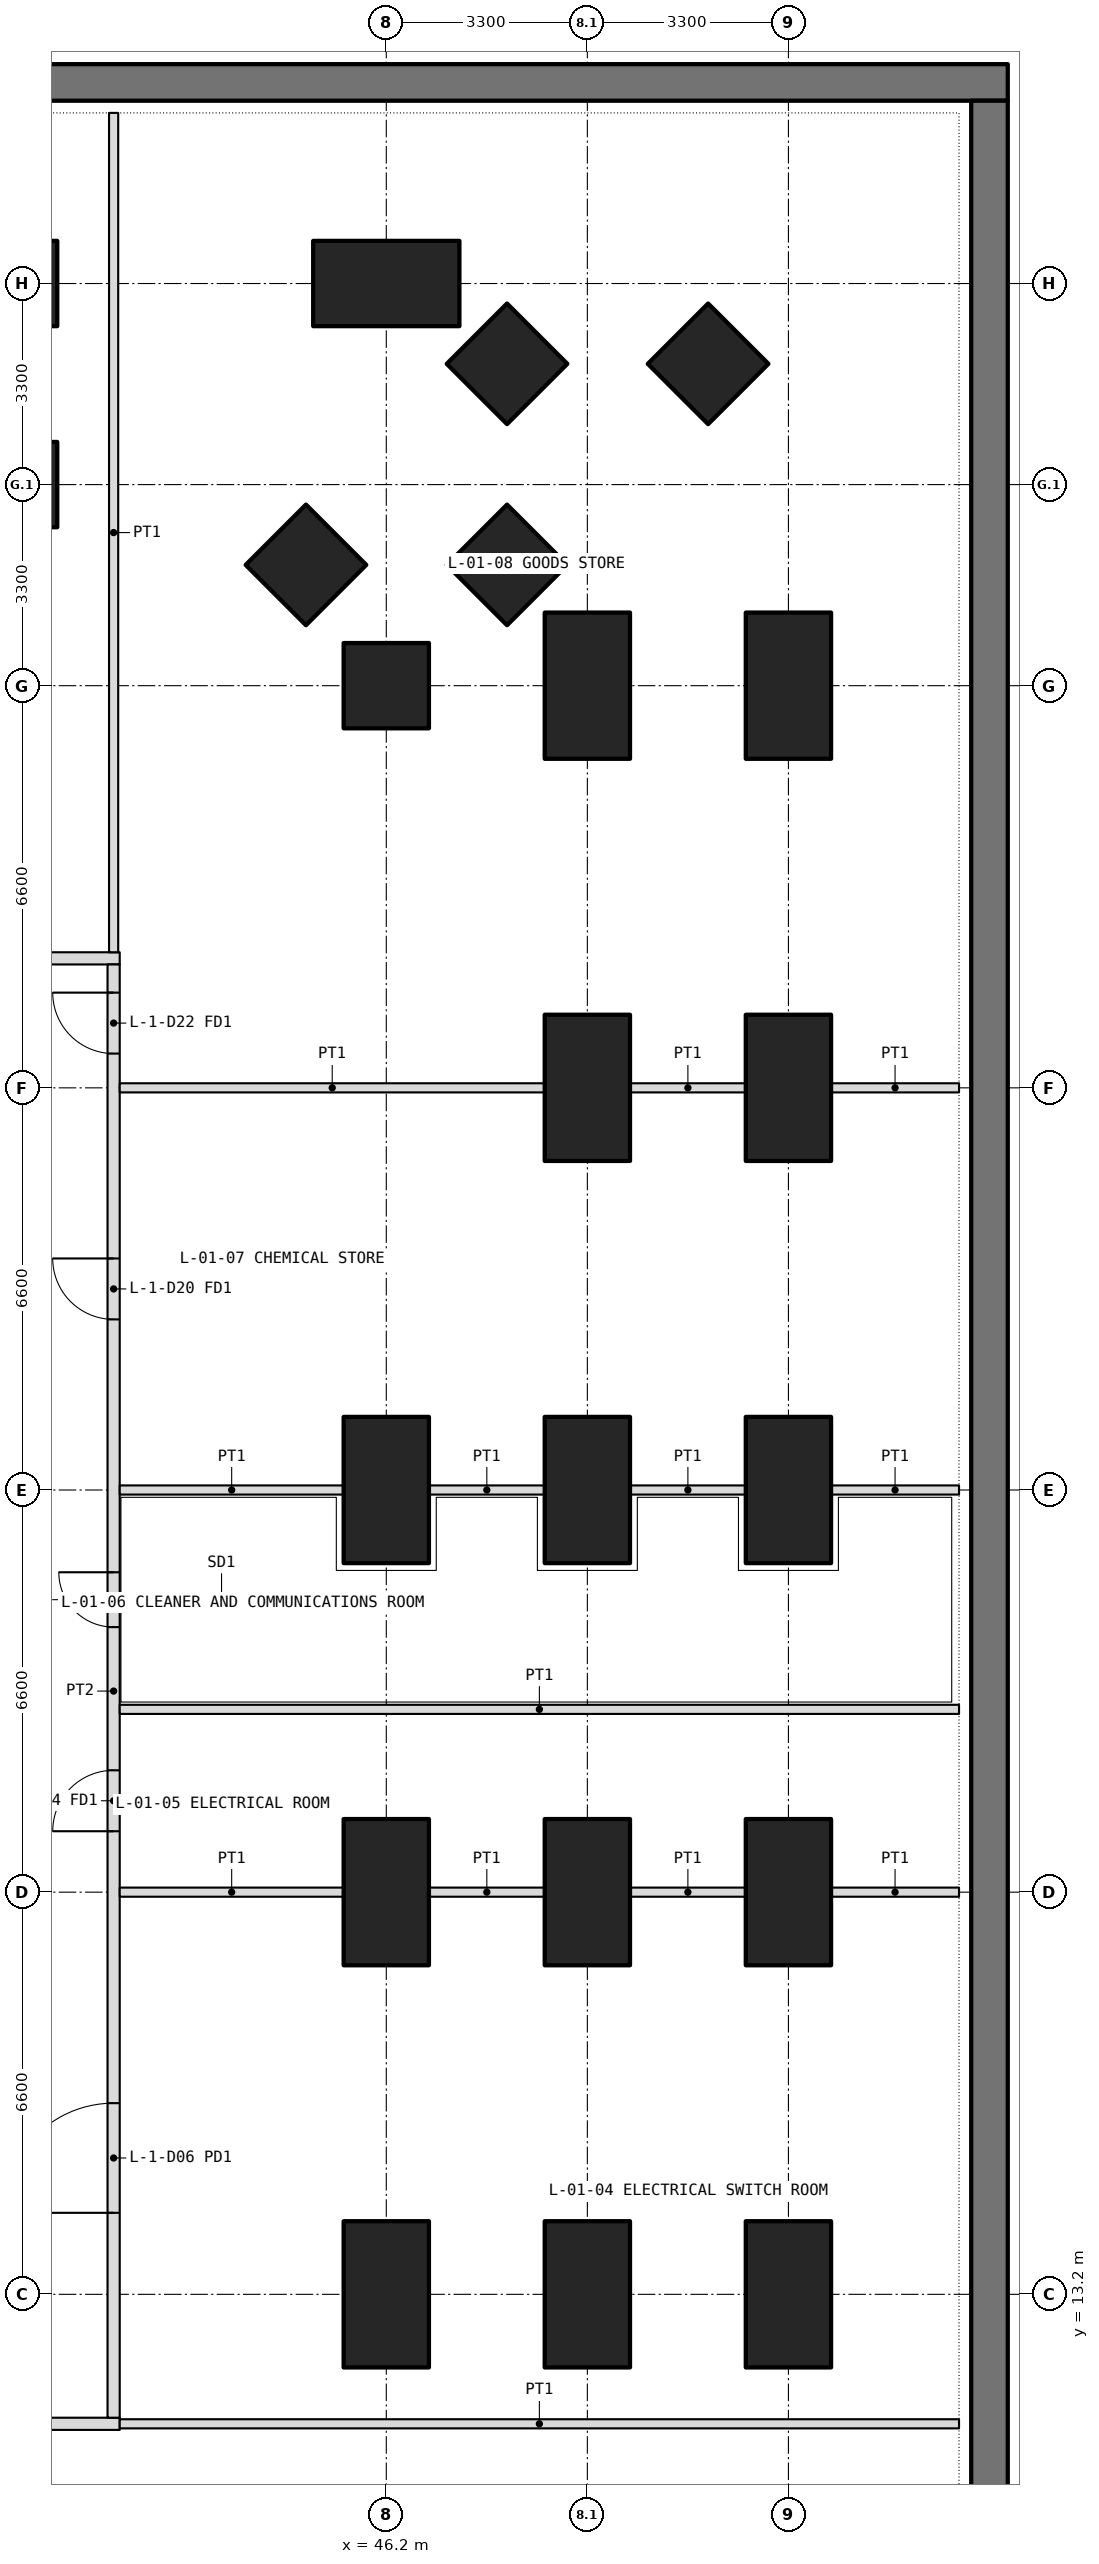
"""IFC4 building model, lengths in metres.
Left out: names, types, materials, properties, quantities, classifications, styles, units other than length and angle.
Written with IfcOpenShell. Run it as: python <this file> out.ifc"""

import sys

from ifc_helpers import new_model, si_unit, direction, frame, frame_2d, origin, origin_2d, place, context, subcontext, project, spatial, rectangle, extrude, element, fill, save


model = new_model("IFC4")
c1 = context("Model", 3, precision=1e-05, world=origin(), true_north=direction((0.0, 1.0)))
c2 = subcontext(c1, "Body", "Model", "MODEL_VIEW")
j1 = project(units=[si_unit("LENGTHUNIT", "METRE"), si_unit("PLANEANGLEUNIT", "RADIAN")], contexts=[c1])
p1 = place(None, origin())
s1 = spatial("IfcSite", under=j1, at=p1, CompositionType="ELEMENT")
p2 = place(p1, origin())
s2 = spatial("IfcBuilding", under=s1, at=p2, CompositionType="ELEMENT")
p3 = place(p2, frame((0.0, 0.0, -5.4)))
s3 = spatial("IfcBuildingStorey", under=s2, at=p3, CompositionType="ELEMENT", Elevation=-5.4)
p4 = place(p3, frame((-3.6, 49.5, -0.15), z_axis=(0.0, 0.0, 1.0), x_axis=(1.0, 0.0, 0.0)))
e1 = element("IfcWall", 1, at=p4, inside=s3, PredefinedType="SOLIDWALL", context=c2, shape_type="SweptSolid", body=[
    extrude(rectangle(XDim=60.0, YDim=0.6, at=frame_2d((30.0, 0.0))), origin(), (0.0, 0.0, 1.0), 5.2),
])
p5 = place(p3, frame((56.1, -3.0, -0.15), z_axis=(0.0, 0.0, 1.0), x_axis=(0.0, 1.0, 0.0)))
e2 = element("IfcWall", 2, at=p5, inside=s3, PredefinedType="SOLIDWALL", context=c2, shape_type="SweptSolid", body=[
    extrude(rectangle(XDim=52.2, YDim=0.6, at=frame_2d((26.1, 0.0))), origin(), (0.0, 0.0, 1.0), 5.2),
])
p6 = place(p3, frame((51.482, 44.882, -0.15), z_axis=(0.0, 0.0, 1.0), x_axis=(0.707106781187, 0.707106781187, 0.0)))
e3 = element("IfcColumn", 3, at=p6, inside=s3, PredefinedType="COLUMN", context=c2, shape_type="SweptSolid", body=[
    extrude(rectangle(XDim=1.4, YDim=1.4, at=origin_2d()), origin(), (0.0, 0.0, 1.0), 5.55),
])
for number, where, z_axis, x_axis in (
    (4, (52.8, 13.2, -0.15), (0.0, 0.0, 1.0), (0.0, 1.0, 0.0)),
    (5, (52.8, 19.8, -0.15), (0.0, 0.0, 1.0), (0.0, 1.0, 0.0)),
    (6, (52.8, 26.4, -0.15), (0.0, 0.0, 1.0), (0.0, 1.0, 0.0)),
    (7, (52.8, 33.0, -0.15), (0.0, 0.0, 1.0), (0.0, 1.0, 0.0)),
    (8, (52.8, 39.6, -0.15), (0.0, 0.0, 1.0), (0.0, 1.0, 0.0)),
    (9, (39.6, 46.2, -0.15), (0.0, 0.0, 1.0), (1.0, 0.0, 0.0)),
    (10, (46.2, 46.2, -0.15), (0.0, 0.0, 1.0), (1.0, 0.0, 0.0)),
):
    element("IfcColumn", number, at=place(p3, frame(where, z_axis=z_axis, x_axis=x_axis)), inside=s3, PredefinedType="COLUMN", context=c2, shape_type="SweptSolid", body=[
        extrude(rectangle(XDim=2.4, YDim=1.4, at=origin_2d()), origin(), (0.0, 0.0, 1.0), 5.55),
    ])
for number, where, z_axis, x_axis in (
    (11, (46.2, 39.6, -0.15), (0.0, 0.0, 1.0), (1.0, 0.0, 0.0)),
    (12, (48.182, 44.882, -0.15), (0.0, 0.0, 1.0), (0.707, 0.707, 0.0)),
):
    element("IfcColumn", number, at=place(p3, frame(where, z_axis=z_axis, x_axis=x_axis)), inside=s3, PredefinedType="COLUMN", context=c2, shape_type="SweptSolid", body=[
        extrude(rectangle(XDim=1.4, YDim=1.4, at=origin_2d()), origin(), (0.0, 0.0, 1.0), 5.55),
    ])
for number, where, z_axis, x_axis in (
    (13, (49.5, 13.2, -0.15), (0.0, 0.0, 1.0), (0.0, 1.0, 0.0)),
    (14, (49.5, 19.8, -0.15), (0.0, 0.0, 1.0), (0.0, 1.0, 0.0)),
    (15, (49.5, 26.4, -0.15), (0.0, 0.0, 1.0), (0.0, 1.0, 0.0)),
    (16, (49.5, 33.0, -0.15), (0.0, 0.0, 1.0), (0.0, 1.0, 0.0)),
    (17, (49.5, 39.6, -0.15), (0.0, 0.0, 1.0), (0.0, 1.0, 0.0)),
):
    element("IfcColumn", number, at=place(p3, frame(where, z_axis=z_axis, x_axis=x_axis)), inside=s3, PredefinedType="COLUMN", context=c2, shape_type="SweptSolid", body=[
        extrude(rectangle(XDim=2.4, YDim=1.4, at=origin_2d()), origin(), (0.0, 0.0, 1.0), 5.55),
    ])
p7 = place(p3, frame((48.182, 41.582, -0.15), z_axis=(0.0, 0.0, 1.0), x_axis=(0.707106781187, 0.707106781187, 0.0)))
e18 = element("IfcColumn", 18, at=p7, inside=s3, PredefinedType="COLUMN", context=c2, shape_type="SweptSolid", body=[
    extrude(rectangle(XDim=1.4, YDim=1.4, at=origin_2d()), origin(), (0.0, 0.0, 1.0), 5.55),
])
p8 = place(p3, frame((39.6, 42.9, -0.15), z_axis=(0.0, 0.0, 1.0), x_axis=(1.0, 0.0, 0.0)))
e19 = element("IfcColumn", 19, at=p8, inside=s3, PredefinedType="COLUMN", context=c2, shape_type="SweptSolid", body=[
    extrude(rectangle(XDim=2.4, YDim=1.4, at=origin_2d()), origin(), (0.0, 0.0, 1.0), 5.55),
])
p9 = place(p3, frame((44.882, 41.582, -0.15), z_axis=(0.0, 0.0, 1.0), x_axis=(0.707106781187, 0.707106781187, 0.0)))
e20 = element("IfcColumn", 20, at=p9, inside=s3, PredefinedType="COLUMN", context=c2, shape_type="SweptSolid", body=[
    extrude(rectangle(XDim=1.4, YDim=1.4, at=origin_2d()), origin(), (0.0, 0.0, 1.0), 5.55),
])
for number, where, z_axis, x_axis in (
    (21, (46.2, 13.2, -0.15), (0.0, 0.0, 1.0), (0.0, 1.0, 0.0)),
    (22, (46.2, 19.8, -0.15), (0.0, 0.0, 1.0), (0.0, 1.0, 0.0)),
    (23, (46.2, 26.4, -0.15), (0.0, 0.0, 1.0), (0.0, 1.0, 0.0)),
):
    element("IfcColumn", number, at=place(p3, frame(where, z_axis=z_axis, x_axis=x_axis)), inside=s3, PredefinedType="COLUMN", context=c2, shape_type="SweptSolid", body=[
        extrude(rectangle(XDim=2.4, YDim=1.4, at=origin_2d()), origin(), (0.0, 0.0, 1.0), 5.55),
    ])
p10 = place(p3, frame((10.975, 11.075, 0.0), z_axis=(0.0, 0.0, 1.0), x_axis=(1.0, 0.0, 0.0)))
e24 = element("IfcWall", 24, at=p10, inside=s3, PredefinedType="PARTITIONING", context=c2, shape_type="SweptSolid", body=[
    extrude(rectangle(XDim=30.85, YDim=0.2, at=frame_2d((15.425, 0.0))), origin(), (0.0, 0.0, 1.0), 4.05),
])
p11 = place(p10, frame((3.562, 0.0, 0.0)))
e25 = element("IfcOpeningElement", 25, at=p11, cuts=e24, PredefinedType="OPENING", context=c2, shape_type="SweptSolid", body=[
    extrude(rectangle(XDim=1.8, YDim=2.4, at=frame_2d((0.9, 1.2))), frame((0.0, 0.11, 0.0), z_axis=(0.0, -1.0, 0.0), x_axis=(1.0, 0.0, 0.0)), (0.0, 0.0, 1.0), 0.22),
])
p12 = place(p10, frame((14.525, 0.0, 0.0)))
e26 = element("IfcOpeningElement", 26, at=p12, cuts=e24, PredefinedType="OPENING", context=c2, shape_type="SweptSolid", body=[
    extrude(rectangle(XDim=1.8, YDim=2.4, at=frame_2d((0.9, 1.2))), frame((0.0, 0.11, 0.0), z_axis=(0.0, -1.0, 0.0), x_axis=(1.0, 0.0, 0.0)), (0.0, 0.0, 1.0), 0.22),
])
p13 = place(p10, frame((25.488, 0.0, 0.0)))
e27 = element("IfcOpeningElement", 27, at=p13, cuts=e24, PredefinedType="OPENING", context=c2, shape_type="SweptSolid", body=[
    extrude(rectangle(XDim=1.8, YDim=2.4, at=frame_2d((0.9, 1.2))), frame((0.0, 0.11, 0.0), z_axis=(0.0, -1.0, 0.0), x_axis=(1.0, 0.0, 0.0)), (0.0, 0.0, 1.0), 0.22),
])
p14 = place(p3, frame((10.975, 35.125, 0.0), z_axis=(0.0, 0.0, 1.0), x_axis=(1.0, 0.0, 0.0)))
e28 = element("IfcWall", 28, at=p14, inside=s3, PredefinedType="PARTITIONING", context=c2, shape_type="SweptSolid", body=[
    extrude(rectangle(XDim=30.85, YDim=0.2, at=frame_2d((15.425, 0.0))), origin(), (0.0, 0.0, 1.0), 4.05),
])
p15 = place(p14, frame((3.962, 0.0, 0.0)))
e29 = element("IfcOpeningElement", 29, at=p15, cuts=e28, PredefinedType="OPENING", context=c2, shape_type="SweptSolid", body=[
    extrude(rectangle(XDim=1.0, YDim=2.1, at=frame_2d((0.5, 1.05))), frame((0.0, 0.11, 0.0), z_axis=(0.0, -1.0, 0.0), x_axis=(1.0, 0.0, 0.0)), (0.0, 0.0, 1.0), 0.22),
])
p16 = place(p14, frame((14.925, 0.0, 0.0)))
e30 = element("IfcOpeningElement", 30, at=p16, cuts=e28, PredefinedType="OPENING", context=c2, shape_type="SweptSolid", body=[
    extrude(rectangle(XDim=1.0, YDim=2.1, at=frame_2d((0.5, 1.05))), frame((0.0, 0.11, 0.0), z_axis=(0.0, -1.0, 0.0), x_axis=(1.0, 0.0, 0.0)), (0.0, 0.0, 1.0), 0.22),
])
p17 = place(p14, frame((25.887, 0.0, 0.0)))
e31 = element("IfcOpeningElement", 31, at=p17, cuts=e28, PredefinedType="OPENING", context=c2, shape_type="SweptSolid", body=[
    extrude(rectangle(XDim=1.0, YDim=2.1, at=frame_2d((0.5, 1.05))), frame((0.0, 0.11, 0.0), z_axis=(0.0, -1.0, 0.0), x_axis=(1.0, 0.0, 0.0)), (0.0, 0.0, 1.0), 0.22),
])
p18 = place(p3, frame((41.725, 11.175, 0.0), z_axis=(0.0, 0.0, 1.0), x_axis=(0.0, 1.0, 0.0)))
e32 = element("IfcWall", 32, at=p18, inside=s3, PredefinedType="PARTITIONING", context=c2, shape_type="SweptSolid", body=[
    extrude(rectangle(XDim=23.85, YDim=0.2, at=frame_2d((11.925, 0.0))), origin(), (0.0, 0.0, 1.0), 4.05),
])
p19 = place(p18, frame((3.363, 0.0, 0.0)))
e33 = element("IfcOpeningElement", 33, at=p19, cuts=e32, PredefinedType="OPENING", context=c2, shape_type="SweptSolid", body=[
    extrude(rectangle(XDim=1.8, YDim=2.4, at=frame_2d((0.9, 1.2))), frame((0.0, 0.11, 0.0), z_axis=(0.0, -1.0, 0.0), x_axis=(1.0, 0.0, 0.0)), (0.0, 0.0, 1.0), 0.22),
])
p20 = place(p18, frame((9.625, 0.0, 0.0)))
e34 = element("IfcOpeningElement", 34, at=p20, cuts=e32, PredefinedType="OPENING", context=c2, shape_type="SweptSolid", body=[
    extrude(rectangle(XDim=1.0, YDim=2.1, at=frame_2d((0.5, 1.05))), frame((0.0, 0.11, 0.0), z_axis=(0.0, -1.0, 0.0), x_axis=(1.0, 0.0, 0.0)), (0.0, 0.0, 1.0), 0.22),
])
p21 = place(p18, frame((12.975, 0.0, 0.0)))
e35 = element("IfcOpeningElement", 35, at=p21, cuts=e32, PredefinedType="OPENING", context=c2, shape_type="SweptSolid", body=[
    extrude(rectangle(XDim=0.9, YDim=2.1, at=frame_2d((0.45, 1.05))), frame((0.0, 0.11, 0.0), z_axis=(0.0, -1.0, 0.0), x_axis=(1.0, 0.0, 0.0)), (0.0, 0.0, 1.0), 0.22),
])
p22 = place(p18, frame((18.025, 0.0, 0.0)))
e36 = element("IfcOpeningElement", 36, at=p22, cuts=e32, PredefinedType="OPENING", context=c2, shape_type="SweptSolid", body=[
    extrude(rectangle(XDim=1.0, YDim=2.1, at=frame_2d((0.5, 1.05))), frame((0.0, 0.11, 0.0), z_axis=(0.0, -1.0, 0.0), x_axis=(1.0, 0.0, 0.0)), (0.0, 0.0, 1.0), 0.22),
])
p23 = place(p18, frame((22.387, 0.0, 0.0)))
e37 = element("IfcOpeningElement", 37, at=p23, cuts=e32, PredefinedType="OPENING", context=c2, shape_type="SweptSolid", body=[
    extrude(rectangle(XDim=1.0, YDim=2.1, at=frame_2d((0.5, 1.05))), frame((0.0, 0.11, 0.0), z_axis=(0.0, -1.0, 0.0), x_axis=(1.0, 0.0, 0.0)), (0.0, 0.0, 1.0), 0.22),
])
p24 = place(p3, frame((55.6, 11.075, 0.0), z_axis=(0.0, 0.0, 1.0), x_axis=(-1.0, 0.0, 0.0)))
e38 = element("IfcWall", 38, at=p24, inside=s3, PredefinedType="PARTITIONING", context=c2, shape_type="SweptSolid", body=[
    extrude(rectangle(XDim=13.775, YDim=0.15, at=frame_2d((6.888, 0.0))), origin(), (0.0, 0.0, 1.0), 3.85),
])
p25 = place(p3, frame((41.725, 49.0, 0.0), z_axis=(0.0, 0.0, 1.0), x_axis=(0.0, -1.0, 0.0)))
e39 = element("IfcWall", 39, at=p25, inside=s3, PredefinedType="PARTITIONING", context=c2, shape_type="SweptSolid", body=[
    extrude(rectangle(XDim=13.775, YDim=0.15, at=frame_2d((6.887, 0.0))), origin(), (0.0, 0.0, 1.0), 3.85),
])
p26 = place(p3, frame((55.6, 22.8, 0.0), z_axis=(0.0, 0.0, 1.0), x_axis=(-1.0, 0.0, 0.0)))
e40 = element("IfcWall", 40, at=p26, inside=s3, PredefinedType="PARTITIONING", context=c2, shape_type="SweptSolid", body=[
    extrude(rectangle(XDim=13.775, YDim=0.15, at=frame_2d((6.888, 0.0))), origin(), (0.0, 0.0, 1.0), 3.85),
])
p27 = place(p3, frame((55.6, 26.4, 0.0), z_axis=(0.0, 0.0, 1.0), x_axis=(-1.0, 0.0, 0.0)))
e41 = element("IfcWall", 41, at=p27, inside=s3, PredefinedType="PARTITIONING", context=c2, shape_type="SweptSolid", body=[
    extrude(rectangle(XDim=2.1, YDim=0.15, at=frame_2d((1.05, 0.0))), origin(), (0.0, 0.0, 1.0), 4.05),
])
for number, where, z_axis, x_axis in (
    (42, (52.1, 26.4, 0.0), (0.0, 0.0, 1.0), (-1.0, 0.0, 0.0)),
    (43, (48.8, 26.4, 0.0), (0.0, 0.0, 1.0), (-1.0, 0.0, 0.0)),
):
    element("IfcWall", number, at=place(p3, frame(where, z_axis=z_axis, x_axis=x_axis)), inside=s3, PredefinedType="PARTITIONING", context=c2, shape_type="SweptSolid", body=[
        extrude(rectangle(XDim=1.9, YDim=0.15, at=frame_2d((0.95, 0.0))), origin(), (0.0, 0.0, 1.0), 4.05),
    ])
p28 = place(p3, frame((45.5, 26.4, 0.0), z_axis=(0.0, 0.0, 1.0), x_axis=(-1.0, 0.0, 0.0)))
e44 = element("IfcWall", 44, at=p28, inside=s3, PredefinedType="PARTITIONING", context=c2, shape_type="SweptSolid", body=[
    extrude(rectangle(XDim=3.675, YDim=0.15, at=frame_2d((1.837, 0.0))), origin(), (0.0, 0.0, 1.0), 4.05),
])
p29 = place(p3, frame((55.6, 19.8, 0.0), z_axis=(0.0, 0.0, 1.0), x_axis=(-1.0, 0.0, 0.0)))
e45 = element("IfcWall", 45, at=p29, inside=s3, PredefinedType="PARTITIONING", context=c2, shape_type="SweptSolid", body=[
    extrude(rectangle(XDim=2.1, YDim=0.15, at=frame_2d((1.05, 0.0))), origin(), (0.0, 0.0, 1.0), 4.05),
])
for number, where, z_axis, x_axis in (
    (46, (52.1, 19.8, 0.0), (0.0, 0.0, 1.0), (-1.0, 0.0, 0.0)),
    (47, (48.8, 19.8, 0.0), (0.0, 0.0, 1.0), (-1.0, 0.0, 0.0)),
):
    element("IfcWall", number, at=place(p3, frame(where, z_axis=z_axis, x_axis=x_axis)), inside=s3, PredefinedType="PARTITIONING", context=c2, shape_type="SweptSolid", body=[
        extrude(rectangle(XDim=1.9, YDim=0.15, at=frame_2d((0.95, 0.0))), origin(), (0.0, 0.0, 1.0), 4.05),
    ])
p30 = place(p3, frame((45.5, 19.8, 0.0), z_axis=(0.0, 0.0, 1.0), x_axis=(-1.0, 0.0, 0.0)))
e48 = element("IfcWall", 48, at=p30, inside=s3, PredefinedType="PARTITIONING", context=c2, shape_type="SweptSolid", body=[
    extrude(rectangle(XDim=3.675, YDim=0.15, at=frame_2d((1.837, 0.0))), origin(), (0.0, 0.0, 1.0), 4.05),
])
p31 = place(p3, frame((55.6, 33.0, 0.0), z_axis=(0.0, 0.0, 1.0), x_axis=(-1.0, 0.0, 0.0)))
e49 = element("IfcWall", 49, at=p31, inside=s3, PredefinedType="PARTITIONING", context=c2, shape_type="SweptSolid", body=[
    extrude(rectangle(XDim=2.1, YDim=0.15, at=frame_2d((1.05, 0.0))), origin(), (0.0, 0.0, 1.0), 4.05),
])
p32 = place(p3, frame((52.1, 33.0, 0.0), z_axis=(0.0, 0.0, 1.0), x_axis=(-1.0, 0.0, 0.0)))
e50 = element("IfcWall", 50, at=p32, inside=s3, PredefinedType="PARTITIONING", context=c2, shape_type="SweptSolid", body=[
    extrude(rectangle(XDim=1.9, YDim=0.15, at=frame_2d((0.95, 0.0))), origin(), (0.0, 0.0, 1.0), 4.05),
])
p33 = place(p3, frame((48.8, 33.0, 0.0), z_axis=(0.0, 0.0, 1.0), x_axis=(-1.0, 0.0, 0.0)))
e51 = element("IfcWall", 51, at=p33, inside=s3, PredefinedType="PARTITIONING", context=c2, shape_type="SweptSolid", body=[
    extrude(rectangle(XDim=6.975, YDim=0.15, at=frame_2d((3.488, 0.0))), origin(), (0.0, 0.0, 1.0), 4.05),
])
p34 = place(p19, origin())
e52 = element("IfcDoor", 52, at=p34, inside=s3, OperationType="DOUBLE_DOOR_SINGLE_SWING", PredefinedType="DOOR", context=c2, shape_type="SweptSolid", body=[
    extrude(rectangle(XDim=1.8, YDim=2.4, at=frame_2d((0.9, 1.2))), frame((0.0, 0.025, 0.0), z_axis=(0.0, -1.0, 0.0), x_axis=(1.0, 0.0, 0.0)), (0.0, 0.0, 1.0), 0.05),
])
fill(e33, e52)
p35 = place(p20, origin())
e53 = element("IfcDoor", 53, at=p35, inside=s3, OperationType="SINGLE_SWING_LEFT", PredefinedType="DOOR", context=c2, shape_type="SweptSolid", body=[
    extrude(rectangle(XDim=1.0, YDim=2.1, at=frame_2d((0.5, 1.05))), frame((0.0, 0.025, 0.0), z_axis=(0.0, -1.0, 0.0), x_axis=(1.0, 0.0, 0.0)), (0.0, 0.0, 1.0), 0.05),
])
fill(e34, e53)
p36 = place(p21, origin())
e54 = element("IfcDoor", 54, at=p36, inside=s3, OperationType="SINGLE_SWING_RIGHT", PredefinedType="DOOR", context=c2, shape_type="SweptSolid", body=[
    extrude(rectangle(XDim=0.9, YDim=2.1, at=frame_2d((0.45, 1.05))), frame((0.0, 0.025, 0.0), z_axis=(0.0, -1.0, 0.0), x_axis=(1.0, 0.0, 0.0)), (0.0, 0.0, 1.0), 0.05),
])
fill(e35, e54)
p37 = place(p22, origin())
e55 = element("IfcDoor", 55, at=p37, inside=s3, OperationType="SINGLE_SWING_RIGHT", PredefinedType="DOOR", context=c2, shape_type="SweptSolid", body=[
    extrude(rectangle(XDim=1.0, YDim=2.1, at=frame_2d((0.5, 1.05))), frame((0.0, 0.025, 0.0), z_axis=(0.0, -1.0, 0.0), x_axis=(1.0, 0.0, 0.0)), (0.0, 0.0, 1.0), 0.05),
])
fill(e36, e55)
p38 = place(p23, origin())
e56 = element("IfcDoor", 56, at=p38, inside=s3, OperationType="SINGLE_SWING_RIGHT", PredefinedType="DOOR", context=c2, shape_type="SweptSolid", body=[
    extrude(rectangle(XDim=1.0, YDim=2.1, at=frame_2d((0.5, 1.05))), frame((0.0, 0.025, 0.0), z_axis=(0.0, -1.0, 0.0), x_axis=(1.0, 0.0, 0.0)), (0.0, 0.0, 1.0), 0.05),
])
fill(e37, e56)
save(model, sys.argv[1])
